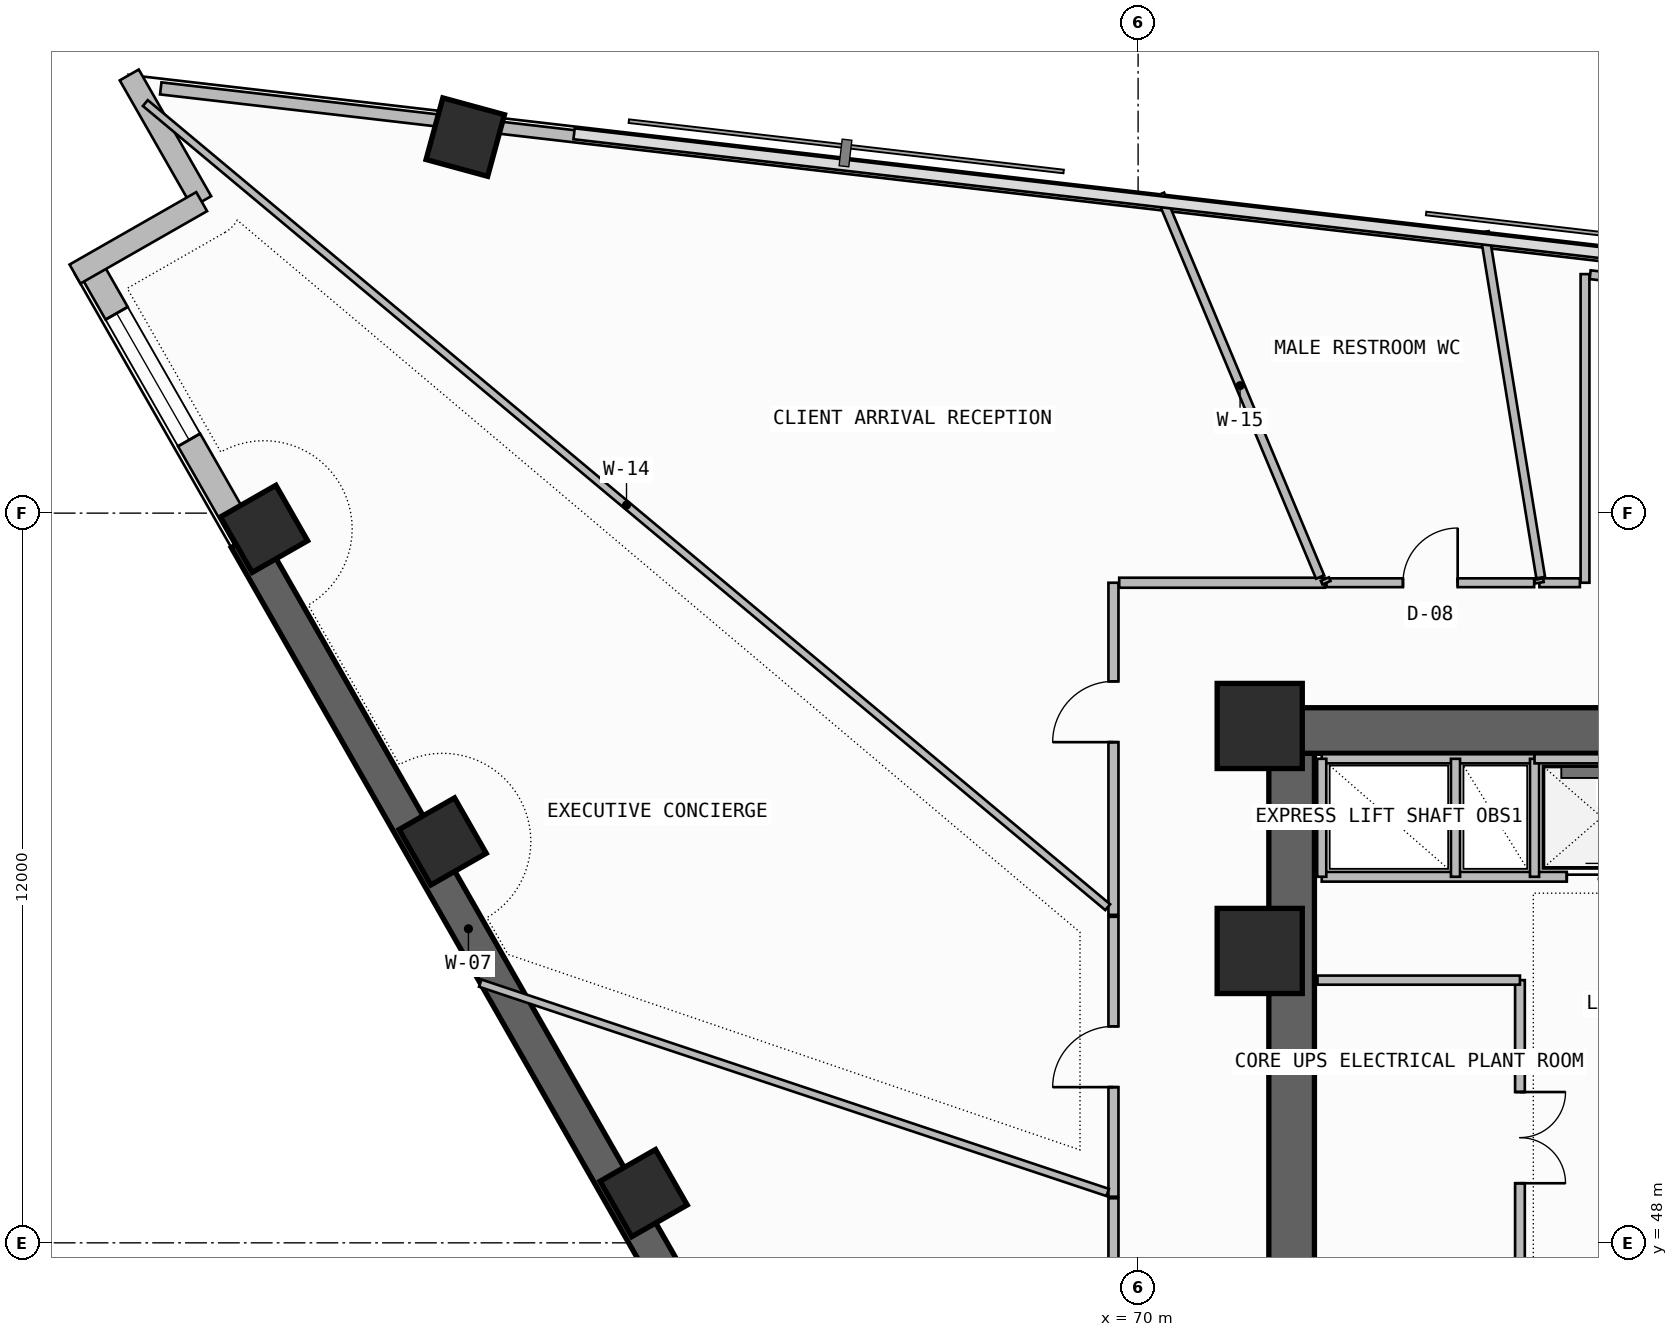
"""IFC4 building model, lengths in metres.
Left out: names, types, materials, properties, quantities, classifications, styles, units other than length and angle.
Written with IfcOpenShell. Run it as: python <this file> out.ifc"""

import sys

from ifc_helpers import new_model, si_unit, direction, frame, frame_2d, origin, origin_2d, place, context, subcontext, project, spatial, rectangle, extrude, element, fill, save


model = new_model("IFC4")
c1 = context("Model", 3, precision=1e-05, world=origin(), true_north=direction((0.0, 1.0)))
c2 = subcontext(c1, "Body", "Model", "MODEL_VIEW")
j1 = project(units=[si_unit("LENGTHUNIT", "METRE"), si_unit("PLANEANGLEUNIT", "RADIAN")], contexts=[c1])
p1 = place(None, origin())
s1 = spatial("IfcSite", under=j1, at=p1, CompositionType="ELEMENT")
p2 = place(p1, origin())
s2 = spatial("IfcBuilding", under=s1, at=p2, CompositionType="ELEMENT")
p3 = place(p2, frame((0.0, 0.0, 200.9)))
s3 = spatial("IfcBuildingStorey", under=s2, at=p3, CompositionType="ELEMENT", Elevation=200.9)
p4 = place(p3, frame((72.525, 43.35, -0.4), z_axis=(0.0, 0.0, 1.0), x_axis=(0.0, 1.0, 0.0)))
e1 = element("IfcWall", 1, at=p4, inside=s3, PredefinedType="SHEAR", context=c2, shape_type="SweptSolid", body=[
    extrude(rectangle(XDim=12.7, YDim=0.75, at=frame_2d((6.35, 0.0))), origin(), (0.0, 0.0, 1.0), 3.66),
])
p5 = place(p4, frame((1.35, 0.0, 0.4)))
e2 = element("IfcOpeningElement", 2, at=p5, cuts=e1, PredefinedType="OPENING", context=c2, shape_type="SweptSolid", body=[
    extrude(rectangle(XDim=1.2, YDim=2.2, at=frame_2d((0.6, 1.1))), frame((0.0, 0.385, 0.0), z_axis=(0.0, -1.0, 0.0), x_axis=(1.0, 0.0, 0.0)), (0.0, 0.0, 1.0), 0.77),
])
p6 = place(p3, frame((72.0, 56.425, -0.4), z_axis=(0.0, 0.0, 1.0), x_axis=(1.0, 0.0, 0.0)))
e3 = element("IfcWall", 3, at=p6, inside=s3, PredefinedType="SHEAR", context=c2, shape_type="SweptSolid", body=[
    extrude(rectangle(XDim=13.75, YDim=0.75, at=frame_2d((6.875, 0.0))), origin(), (0.0, 0.0, 1.0), 3.66),
])
for number, where, z_axis, x_axis in (
    (4, (72.0, 52.8, 0.0), (0.0, 0.0, 1.0), (1.0, 0.0, 0.0)),
    (5, (72.0, 56.5, 0.0), (0.0, 0.0, 1.0), (1.0, 0.0, 0.0)),
):
    element("IfcColumn", number, at=place(p3, frame(where, z_axis=z_axis, x_axis=x_axis)), inside=s3, PredefinedType="COLUMN", context=c2, shape_type="SweptSolid", body=[
        extrude(rectangle(XDim=1.4, YDim=1.4, at=origin_2d()), origin(), (0.0, 0.0, 1.0), 3.52),
    ])
for number, where, z_axis, x_axis in (
    (6, (58.934, 66.184, -0.4), (0.0, 0.0, 1.0), (0.263, 0.965, 0.0)),
    (7, (55.625, 59.742, -0.4), (0.0, 0.0, 1.0), (-0.496, 0.868, 0.0)),
    (8, (58.563, 54.601, -0.4), (0.0, 0.0, 1.0), (-0.496, 0.868, 0.0)),
):
    element("IfcColumn", number, at=place(p3, frame(where, z_axis=z_axis, x_axis=x_axis)), inside=s3, PredefinedType="COLUMN", context=c2, shape_type="SweptSolid", body=[
        extrude(rectangle(XDim=1.05, YDim=1.05, at=origin_2d()), origin(), (0.0, 0.0, 1.0), 3.92),
    ])
p7 = place(p3, frame((61.868, 48.818, 0.0), z_axis=(0.0, 0.0, 1.0), x_axis=(-0.496216503675, 0.868198814489, 0.0)))
e9 = element("IfcColumn", 9, at=p7, inside=s3, PredefinedType="COLUMN", context=c2, shape_type="SweptSolid", body=[
    extrude(rectangle(XDim=1.05, YDim=1.05, at=origin_2d()), origin(), (0.0, 0.0, 1.0), 3.52),
])
p8 = place(p3, frame((52.754, 64.068, 0.0), z_axis=(0.0, 0.0, 1.0), x_axis=(0.496209984367, -0.868202540548, 0.0)))
e10 = element("IfcWall", 10, at=p8, inside=s3, PredefinedType="SOLIDWALL", context=c2, shape_type="SweptSolid", body=[
    extrude(rectangle(XDim=5.181, YDim=0.42, at=frame_2d((2.59, 0.0))), origin(), (0.0, 0.0, 1.0), 2.645),
])
p9 = place(p8, frame((0.9, 0.0, 1.1)))
e11 = element("IfcOpeningElement", 11, at=p9, cuts=e10, PredefinedType="OPENING", context=c2, shape_type="SweptSolid", body=[
    extrude(rectangle(XDim=2.4, YDim=1.2, at=frame_2d((1.2, 0.6))), frame((0.0, 0.22, 0.0), z_axis=(0.0, -1.0, 0.0), x_axis=(1.0, 0.0, 0.0)), (0.0, 0.0, 1.0), 0.44),
])
p10 = place(p3, frame((55.325, 59.57, -0.4), z_axis=(0.0, 0.0, 1.0), x_axis=(0.496211351597, -0.868201759124, 0.0)))
e12 = element("IfcWall", 12, at=p10, inside=s3, PredefinedType="SHEAR", context=c2, shape_type="SweptSolid", body=[
    extrude(rectangle(XDim=19.243, YDim=0.55, at=frame_2d((9.622, 0.0))), origin(), (0.0, 0.0, 1.0), 3.66),
])
p11 = place(p10, frame((14.757, 0.0, 1.1)))
e13 = element("IfcOpeningElement", 13, at=p11, cuts=e12, PredefinedType="OPENING", context=c2, shape_type="SweptSolid", body=[
    extrude(rectangle(XDim=2.4, YDim=1.2, at=frame_2d((1.2, 0.6))), frame((0.0, 0.285, 0.0), z_axis=(0.0, -1.0, 0.0), x_axis=(1.0, 0.0, 0.0)), (0.0, 0.0, 1.0), 0.57),
])
p12 = place(p3, frame((53.408, 67.206, 0.0), z_axis=(0.0, 0.0, 1.0), x_axis=(0.496292324652, -0.868155474838, 0.0)))
e14 = element("IfcWall", 14, at=p12, inside=s3, PredefinedType="SOLIDWALL", context=c2, shape_type="SweptSolid", body=[
    extrude(rectangle(XDim=2.4, YDim=0.36, at=frame_2d((1.2, 0.0))), origin(), (0.0, 0.0, 1.0), 3.26),
])
p13 = place(p3, frame((54.599, 65.123, 0.0), z_axis=(0.0, 0.0, 1.0), x_axis=(-0.86818053093, -0.4962484919, 0.0)))
e15 = element("IfcWall", 15, at=p13, inside=s3, PredefinedType="SOLIDWALL", context=c2, shape_type="SweptSolid", body=[
    extrude(rectangle(XDim=2.4, YDim=0.36, at=frame_2d((1.2, 0.0))), origin(), (0.0, 0.0, 1.0), 3.26),
])
p14 = place(p3, frame((85.424, 63.338, 0.0), z_axis=(0.0, 0.0, 1.0), x_axis=(-0.993364714048, 0.115006716693, 0.0)))
e16 = element("IfcWall", 16, at=p14, inside=s3, PredefinedType="PARAPET", context=c2, shape_type="SweptSolid", body=[
    extrude(rectangle(XDim=26.302, YDim=0.2, at=frame_2d((13.151, 0.0))), origin(), (0.0, 0.0, 1.0), 1.15),
])
p15 = place(p3, frame((58.622, 66.441, 0.0), z_axis=(0.0, 0.0, 1.0), x_axis=(-0.993362937665, 0.115022059074, 0.0)))
e17 = element("IfcWall", 17, at=p15, inside=s3, PredefinedType="PARAPET", context=c2, shape_type="SweptSolid", body=[
    extrude(rectangle(XDim=4.727, YDim=0.2, at=frame_2d((2.364, 0.0))), origin(), (0.0, 0.0, 1.0), 1.15),
])
p16 = place(p3, frame((76.28, 47.18, 0.0), z_axis=(0.0, 0.0, 1.0), x_axis=(0.0, 1.0, 0.0)))
e18 = element("IfcWall", 18, at=p16, inside=s3, PredefinedType="SOLIDWALL", context=c2, shape_type="SweptSolid", body=[
    extrude(rectangle(XDim=5.14, YDim=0.16, at=frame_2d((2.57, 0.0))), origin(), (0.0, 0.0, 1.0), 3.26),
])
p17 = place(p16, frame((1.8, 0.0, 0.0)))
e19 = element("IfcOpeningElement", 19, at=p17, cuts=e18, PredefinedType="OPENING", context=c2, shape_type="SweptSolid", body=[
    extrude(rectangle(XDim=1.5, YDim=2.25, at=frame_2d((0.75, 1.125))), frame((0.0, 0.09, 0.0), z_axis=(0.0, -1.0, 0.0), x_axis=(1.0, 0.0, 0.0)), (0.0, 0.0, 1.0), 0.18),
])
p18 = place(p3, frame((72.95, 52.32, 0.0), z_axis=(0.0, 0.0, 1.0), x_axis=(1.0, 0.0, 0.0)))
e20 = element("IfcWall", 20, at=p18, inside=s3, PredefinedType="SOLIDWALL", context=c2, shape_type="SweptSolid", body=[
    extrude(rectangle(XDim=3.33, YDim=0.15, at=frame_2d((1.665, 0.0))), origin(), (0.0, 0.0, 1.0), 3.26),
])
p19 = place(p3, frame((73.02, 54.02, 0.0), z_axis=(0.0, 0.0, 1.0), x_axis=(1.0, 0.0, 0.0)))
e21 = element("IfcWall", 21, at=p19, inside=s3, PredefinedType="SOLIDWALL", context=c2, shape_type="SweptSolid", body=[
    extrude(rectangle(XDim=12.08, YDim=0.16, at=frame_2d((6.04, 0.0))), origin(), (0.0, 0.0, 1.0), 3.26),
])
p20 = place(p19, frame((4.03, 0.0, 0.0)))
e22 = element("IfcOpeningElement", 22, at=p20, cuts=e21, PredefinedType="OPENING", context=c2, shape_type="SweptSolid", body=[
    extrude(rectangle(XDim=1.1, YDim=2.25, at=frame_2d((0.55, 1.125))), frame((0.0, 0.09, 0.0), z_axis=(0.0, -1.0, 0.0), x_axis=(1.0, 0.0, 0.0)), (0.0, 0.0, 1.0), 0.18),
])
p21 = place(p19, frame((6.28, 0.0, 0.0)))
e23 = element("IfcOpeningElement", 23, at=p21, cuts=e21, PredefinedType="OPENING", context=c2, shape_type="SweptSolid", body=[
    extrude(rectangle(XDim=1.1, YDim=2.25, at=frame_2d((0.55, 1.125))), frame((0.0, 0.09, 0.0), z_axis=(0.0, -1.0, 0.0), x_axis=(1.0, 0.0, 0.0)), (0.0, 0.0, 1.0), 0.18),
])
p22 = place(p19, frame((8.53, 0.0, 0.0)))
e24 = element("IfcOpeningElement", 24, at=p22, cuts=e21, PredefinedType="OPENING", context=c2, shape_type="SweptSolid", body=[
    extrude(rectangle(XDim=1.1, YDim=2.25, at=frame_2d((0.55, 1.125))), frame((0.0, 0.09, 0.0), z_axis=(0.0, -1.0, 0.0), x_axis=(1.0, 0.0, 0.0)), (0.0, 0.0, 1.0), 0.18),
])
p23 = place(p3, frame((73.02, 55.96, 0.0), z_axis=(0.0, 0.0, 1.0), x_axis=(1.0, 0.0, 0.0)))
e25 = element("IfcWall", 25, at=p23, inside=s3, PredefinedType="SOLIDWALL", context=c2, shape_type="SweptSolid", body=[
    extrude(rectangle(XDim=3.5, YDim=0.15, at=frame_2d((1.75, 0.0))), origin(), (0.0, 0.0, 1.0), 3.26),
])
p24 = place(p3, frame((73.02, 54.02, 0.0), z_axis=(0.0, 0.0, 1.0), x_axis=(0.0, 1.0, 0.0)))
e26 = element("IfcWall", 26, at=p24, inside=s3, PredefinedType="PLUMBINGWALL", context=c2, shape_type="SweptSolid", body=[
    extrude(rectangle(XDim=1.94, YDim=0.15, at=frame_2d((0.97, 0.0))), origin(), (0.0, 0.0, 1.0), 3.26),
])
p25 = place(p3, frame((76.52, 54.02, 0.0), z_axis=(0.0, 0.0, 1.0), x_axis=(0.0, 1.0, 0.0)))
e27 = element("IfcWall", 27, at=p25, inside=s3, PredefinedType="SOLIDWALL", context=c2, shape_type="SweptSolid", body=[
    extrude(rectangle(XDim=1.94, YDim=0.15, at=frame_2d((0.97, 0.0))), origin(), (0.0, 0.0, 1.0), 3.26),
])
p26 = place(p3, frame((75.22, 54.02, 0.0), z_axis=(0.0, 0.0, 1.0), x_axis=(0.0, 1.0, 0.0)))
e28 = element("IfcWall", 28, at=p26, inside=s3, PredefinedType="PLUMBINGWALL", context=c2, shape_type="SweptSolid", body=[
    extrude(rectangle(XDim=1.94, YDim=0.15, at=frame_2d((0.97, 0.0))), origin(), (0.0, 0.0, 1.0), 3.26),
])
p27 = place(p3, frame((76.52, 55.96, 0.0), z_axis=(0.0, 0.0, 1.0), x_axis=(1.0, 0.0, 0.0)))
e29 = element("IfcWall", 29, at=p27, inside=s3, PredefinedType="SOLIDWALL", context=c2, shape_type="SweptSolid", body=[
    extrude(rectangle(XDim=6.7, YDim=0.15, at=frame_2d((3.35, 0.0))), origin(), (0.0, 0.0, 1.0), 3.26),
])
p28 = place(p3, frame((77.35, 63.931, 0.0), z_axis=(0.0, 0.0, 1.0), x_axis=(0.0, -1.0, 0.0)))
e30 = element("IfcWall", 30, at=p28, inside=s3, PredefinedType="PARTITIONING", context=c2, shape_type="SweptSolid", body=[
    extrude(rectangle(XDim=5.075, YDim=0.145, at=frame_2d((2.538, 0.0))), origin(), (0.0, 0.0, 1.0), 3.26),
])
p29 = place(p3, frame((79.65, 63.665, 0.0), z_axis=(0.0, 0.0, 1.0), x_axis=(-0.993371485876, 0.11494821029, 0.0)))
e31 = element("IfcWall", 31, at=p29, inside=s3, PredefinedType="PARTITIONING", context=c2, shape_type="SweptSolid", body=[
    extrude(rectangle(XDim=2.23, YDim=0.145, at=frame_2d((1.115, 0.0))), origin(), (0.0, 0.0, 1.0), 3.26),
])
p30 = place(p3, frame((77.265, 58.855, 0.0), z_axis=(0.0, 0.0, 1.0), x_axis=(-1.0, 0.0, 0.0)))
e32 = element("IfcWall", 32, at=p30, inside=s3, PredefinedType="PARTITIONING", context=c2, shape_type="SweptSolid", body=[
    extrude(rectangle(XDim=0.666, YDim=0.145, at=frame_2d((0.333, 0.0))), origin(), (0.0, 0.0, 1.0), 3.26),
])
p31 = place(p3, frame((76.599, 58.855, 0.0), z_axis=(0.0, 0.0, 1.0), x_axis=(-0.165051759845, 0.98628490639, 0.0)))
e33 = element("IfcWall", 33, at=p31, inside=s3, PredefinedType="PARTITIONING", context=c2, shape_type="SweptSolid", body=[
    extrude(rectangle(XDim=0.061, YDim=0.145, at=frame_2d((0.03, 0.0))), origin(), (0.0, 0.0, 1.0), 3.26),
])
p32 = place(p3, frame((76.621, 58.94, 0.0), z_axis=(0.0, 0.0, 1.0), x_axis=(-0.160748572613, 0.986995388238, 0.0)))
e34 = element("IfcWall", 34, at=p32, inside=s3, PredefinedType="PARTITIONING", context=c2, shape_type="SweptSolid", body=[
    extrude(rectangle(XDim=5.761, YDim=0.145, at=frame_2d((2.88, 0.0))), origin(), (0.0, 0.0, 1.0), 3.26),
])
p33 = place(p3, frame((69.594, 58.855, 0.0), z_axis=(0.0, 0.0, 1.0), x_axis=(0.0, -1.0, 0.0)))
e35 = element("IfcWall", 35, at=p33, inside=s3, PredefinedType="PARTITIONING", context=c2, shape_type="SweptSolid", body=[
    extrude(rectangle(XDim=5.462, YDim=0.165, at=frame_2d((2.731, 0.0))), origin(), (0.0, 0.0, 1.0), 2.745),
])
p34 = place(p33, frame((1.622, 0.0, 0.0)))
e36 = element("IfcOpeningElement", 36, at=p34, cuts=e35, PredefinedType="OPENING", context=c2, shape_type="SweptSolid", body=[
    extrude(rectangle(XDim=1.0, YDim=2.2, at=frame_2d((0.5, 1.1))), frame((0.0, 0.093, 0.0), z_axis=(0.0, -1.0, 0.0), x_axis=(1.0, 0.0, 0.0)), (0.0, 0.0, 1.0), 0.185),
])
p35 = place(p3, frame((73.072, 58.855, 0.0), z_axis=(0.0, 0.0, 1.0), x_axis=(-1.0, 0.0, 0.0)))
e37 = element("IfcWall", 37, at=p35, inside=s3, PredefinedType="PARTITIONING", context=c2, shape_type="SweptSolid", body=[
    extrude(rectangle(XDim=3.383, YDim=0.165, at=frame_2d((1.691, 0.0))), origin(), (0.0, 0.0, 1.0), 3.26),
])
p36 = place(p3, frame((70.361, 65.243, 0.0), z_axis=(0.0, 0.0, 1.0), x_axis=(0.385809453595, -0.922578487456, 0.0)))
e38 = element("IfcWall", 38, at=p36, inside=s3, PredefinedType="PARTITIONING", context=c2, shape_type="SweptSolid", body=[
    extrude(rectangle(XDim=6.822, YDim=0.145, at=frame_2d((3.411, 0.0))), origin(), (0.0, 0.0, 1.0), 3.26),
])
p37 = place(p3, frame((69.5, 53.52, 0.0), z_axis=(0.0, 0.0, 1.0), x_axis=(-0.767399812489, 0.641168876188, 0.0)))
e39 = element("IfcWall", 39, at=p37, inside=s3, PredefinedType="PARTITIONING", context=c2, shape_type="SweptSolid", body=[
    extrude(rectangle(XDim=20.625, YDim=0.125, at=frame_2d((10.312, 0.0))), origin(), (0.0, 0.0, 1.0), 2.645),
])
p38 = place(p3, frame((76.514, 58.855, 0.0), z_axis=(0.0, 0.0, 1.0), x_axis=(-1.0, 0.0, 0.0)))
e40 = element("IfcWall", 40, at=p38, inside=s3, PredefinedType="PARTITIONING", context=c2, shape_type="SweptSolid", body=[
    extrude(rectangle(XDim=3.416, YDim=0.145, at=frame_2d((1.708, 0.0))), origin(), (0.0, 0.0, 1.0), 3.26),
])
p39 = place(p38, frame((1.258, 0.0, 0.0)))
e41 = element("IfcOpeningElement", 41, at=p39, cuts=e40, PredefinedType="OPENING", context=c2, shape_type="SweptSolid", body=[
    extrude(rectangle(XDim=0.9, YDim=2.1, at=frame_2d((0.45, 1.05))), frame((0.0, 0.083, 0.0), z_axis=(0.0, -1.0, 0.0), x_axis=(1.0, 0.0, 0.0)), (0.0, 0.0, 1.0), 0.165),
])
p40 = place(p3, frame((73.098, 58.855, 0.0), z_axis=(0.0, 0.0, 1.0), x_axis=(-0.39708173337, 0.917783251658, 0.0)))
e42 = element("IfcWall", 42, at=p40, inside=s3, PredefinedType="PARTITIONING", context=c2, shape_type="SweptSolid", body=[
    extrude(rectangle(XDim=0.065, YDim=0.145, at=frame_2d((0.033, 0.0))), origin(), (0.0, 0.0, 1.0), 3.26),
])
p41 = place(p3, frame((69.594, 53.362, 0.0), z_axis=(0.0, 0.0, 1.0), x_axis=(0.0, -1.0, 0.0)))
e43 = element("IfcWall", 43, at=p41, inside=s3, PredefinedType="PARTITIONING", context=c2, shape_type="SweptSolid", body=[
    extrude(rectangle(XDim=4.604, YDim=0.165, at=frame_2d((2.302, 0.0))), origin(), (0.0, 0.0, 1.0), 2.745),
])
p42 = place(p41, frame((1.802, 0.0, 0.0)))
e44 = element("IfcOpeningElement", 44, at=p42, cuts=e43, PredefinedType="OPENING", context=c2, shape_type="SweptSolid", body=[
    extrude(rectangle(XDim=1.0, YDim=2.2, at=frame_2d((0.5, 1.1))), frame((0.0, 0.093, 0.0), z_axis=(0.0, -1.0, 0.0), x_axis=(1.0, 0.0, 0.0)), (0.0, 0.0, 1.0), 0.185),
])
p43 = place(p3, frame((69.5, 48.828, 0.0), z_axis=(0.0, 0.0, 1.0), x_axis=(-0.948600230004, 0.31647686114, 0.0)))
e45 = element("IfcWall", 45, at=p43, inside=s3, PredefinedType="PARTITIONING", context=c2, shape_type="SweptSolid", body=[
    extrude(rectangle(XDim=10.879, YDim=0.125, at=frame_2d((5.439, 0.0))), origin(), (0.0, 0.0, 1.0), 2.645),
])
p44 = place(p3, frame((69.594, 48.733, 0.0), z_axis=(0.0, 0.0, 1.0), x_axis=(0.0, -1.0, 0.0)))
e46 = element("IfcWall", 46, at=p44, inside=s3, PredefinedType="PARTITIONING", context=c2, shape_type="SweptSolid", body=[
    extrude(rectangle(XDim=6.739, YDim=0.165, at=frame_2d((3.37, 0.0))), origin(), (0.0, 0.0, 1.0), 3.26),
])
p45 = place(p44, frame((2.869, 0.0, 0.0)))
e47 = element("IfcOpeningElement", 47, at=p45, cuts=e46, PredefinedType="OPENING", context=c2, shape_type="SweptSolid", body=[
    extrude(rectangle(XDim=1.0, YDim=2.2, at=frame_2d((0.5, 1.1))), frame((0.0, 0.093, 0.0), z_axis=(0.0, -1.0, 0.0), x_axis=(1.0, 0.0, 0.0)), (0.0, 0.0, 1.0), 0.185),
])
p46 = place(p9, origin())
e48 = element("IfcWindow", 48, at=p46, inside=s3, PartitioningType="SINGLE_PANEL", PredefinedType="WINDOW", context=c2, shape_type="SweptSolid", body=[
    extrude(rectangle(XDim=2.4, YDim=1.2, at=frame_2d((1.2, 0.6))), frame((0.0, 0.03, 0.0), z_axis=(0.0, -1.0, 0.0), x_axis=(1.0, 0.0, 0.0)), (0.0, 0.0, 1.0), 0.06),
])
fill(e11, e48)
p47 = place(p17, frame((1.5, 0.0, 0.0), z_axis=(0.0, 0.0, 1.0), x_axis=(-1.0, 0.0, 0.0)))
e49 = element("IfcDoor", 49, at=p47, inside=s3, OperationType="DOUBLE_DOOR_SINGLE_SWING", PredefinedType="DOOR", context=c2, shape_type="SweptSolid", body=[
    extrude(rectangle(XDim=1.5, YDim=2.25, at=frame_2d((0.75, 1.125))), frame((0.0, 0.025, 0.0), z_axis=(0.0, -1.0, 0.0), x_axis=(1.0, 0.0, 0.0)), (0.0, 0.0, 1.0), 0.05),
])
fill(e19, e49)
p48 = place(p20, origin())
e50 = element("IfcDoor", 50, at=p48, inside=s3, OperationType="DOUBLE_DOOR_SLIDING", PredefinedType="DOOR", context=c2, shape_type="SweptSolid", body=[
    extrude(rectangle(XDim=1.1, YDim=2.25, at=frame_2d((0.55, 1.125))), frame((0.0, 0.025, 0.0), z_axis=(0.0, -1.0, 0.0), x_axis=(1.0, 0.0, 0.0)), (0.0, 0.0, 1.0), 0.05),
])
fill(e22, e50)
p49 = place(p34, frame((1.0, 0.0, 0.0), z_axis=(0.0, 0.0, 1.0), x_axis=(-1.0, 0.0, 0.0)))
e51 = element("IfcDoor", 51, at=p49, inside=s3, OperationType="SINGLE_SWING_LEFT", PredefinedType="DOOR", context=c2, shape_type="SweptSolid", body=[
    extrude(rectangle(XDim=1.0, YDim=2.2, at=frame_2d((0.5, 1.1))), frame((0.0, 0.025, 0.0), z_axis=(0.0, -1.0, 0.0), x_axis=(1.0, 0.0, 0.0)), (0.0, 0.0, 1.0), 0.05),
])
fill(e36, e51)
p50 = place(p39, frame((0.9, 0.0, 0.0), z_axis=(0.0, 0.0, 1.0), x_axis=(-1.0, 0.0, 0.0)))
e52 = element("IfcDoor", 52, at=p50, inside=s3, OperationType="SINGLE_SWING_RIGHT", PredefinedType="DOOR", context=c2, shape_type="SweptSolid", body=[
    extrude(rectangle(XDim=0.9, YDim=2.1, at=frame_2d((0.45, 1.05))), frame((0.0, 0.025, 0.0), z_axis=(0.0, -1.0, 0.0), x_axis=(1.0, 0.0, 0.0)), (0.0, 0.0, 1.0), 0.05),
])
fill(e41, e52)
p51 = place(p42, frame((1.0, 0.0, 0.0), z_axis=(0.0, 0.0, 1.0), x_axis=(-1.0, 0.0, 0.0)))
e53 = element("IfcDoor", 53, at=p51, inside=s3, OperationType="SINGLE_SWING_LEFT", PredefinedType="DOOR", context=c2, shape_type="SweptSolid", body=[
    extrude(rectangle(XDim=1.0, YDim=2.2, at=frame_2d((0.5, 1.1))), frame((0.0, 0.025, 0.0), z_axis=(0.0, -1.0, 0.0), x_axis=(1.0, 0.0, 0.0)), (0.0, 0.0, 1.0), 0.05),
])
fill(e44, e53)
save(model, sys.argv[1])
